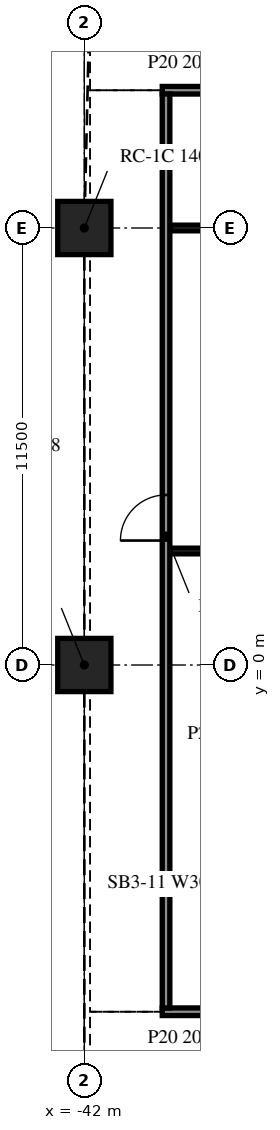
"""IFC4 building model, lengths in metres.
Left out: names, types, materials, properties, quantities, classifications, styles, units other than length and angle.
Written with IfcOpenShell. Run it as: python <this file> out.ifc"""

import sys

from ifc_helpers import new_model, si_unit, direction, frame, frame_2d, origin, origin_2d, place, context, subcontext, project, spatial, rectangle, extrude, element, fill, save


model = new_model("IFC4")
c1 = context("Model", 3, precision=1e-05, world=origin(), true_north=direction((0.0, 1.0)))
c2 = subcontext(c1, "Body", "Model", "MODEL_VIEW")
j1 = project(units=[si_unit("LENGTHUNIT", "METRE"), si_unit("PLANEANGLEUNIT", "RADIAN")], contexts=[c1])
p1 = place(None, origin())
s1 = spatial("IfcSite", under=j1, at=p1, CompositionType="ELEMENT")
p2 = place(p1, origin())
s2 = spatial("IfcBuilding", under=s1, at=p2, CompositionType="ELEMENT")
p3 = place(p2, frame((0.0, 0.0, 109.4)))
s3 = spatial("IfcBuildingStorey", under=s2, at=p3, CompositionType="ELEMENT", Elevation=109.4)
for number, where, z_axis, x_axis in (
    (1, (-42.0, 0.0, -0.34), (0.0, 0.0, 1.0), (1.0, 0.0, 0.0)),
    (2, (-42.0, 11.5, -0.34), (0.0, 0.0, 1.0), (1.0, 0.0, 0.0)),
):
    element("IfcColumn", number, at=place(p3, frame(where, z_axis=z_axis, x_axis=x_axis)), inside=s3, PredefinedType="COLUMN", context=c2, shape_type="SweptSolid", body=[
        extrude(rectangle(XDim=1.4, YDim=1.4, at=origin_2d()), origin(), (0.0, 0.0, 1.0), 4.1),
    ])
p4 = place(p3, frame((-39.95, -9.125, 0.0), z_axis=(0.0, 0.0, 1.0), x_axis=(1.0, 0.0, 0.0)))
e3 = element("IfcWall", 3, at=p4, inside=s3, PredefinedType="PARTITIONING", context=c2, shape_type="SweptSolid", body=[
    extrude(rectangle(XDim=7.75, YDim=0.2, at=frame_2d((3.875, 0.0))), origin(), (0.0, 0.0, 1.0), 3.76),
])
p5 = place(p4, frame((3.3, 0.0, 0.0)))
e4 = element("IfcOpeningElement", 4, at=p5, cuts=e3, PredefinedType="OPENING", context=c2, shape_type="SweptSolid", body=[
    extrude(rectangle(XDim=1.2, YDim=2.1, at=frame_2d((0.6, 1.05))), frame((0.0, 0.11, 0.0), z_axis=(0.0, -1.0, 0.0), x_axis=(1.0, 0.0, 0.0)), (0.0, 0.0, 1.0), 0.22),
])
for number, where, z_axis, x_axis in (
    (5, (-39.75, 3.0, 0.0), (0.0, 0.0, 1.0), (1.0, 0.0, 0.0)),
    (6, (-39.75, 11.5, 0.0), (0.0, 0.0, 1.0), (1.0, 0.0, 0.0)),
):
    element("IfcWall", number, at=place(p3, frame(where, z_axis=z_axis, x_axis=x_axis)), inside=s3, PredefinedType="PARTITIONING", context=c2, shape_type="SweptSolid", body=[
        extrude(rectangle(XDim=7.35, YDim=0.15, at=frame_2d((3.675, 0.0))), origin(), (0.0, 0.0, 1.0), 3.76),
    ])
p6 = place(p3, frame((-39.95, 15.125, 0.0), z_axis=(0.0, 0.0, 1.0), x_axis=(1.0, 0.0, 0.0)))
e7 = element("IfcWall", 7, at=p6, inside=s3, PredefinedType="PARTITIONING", context=c2, shape_type="SweptSolid", body=[
    extrude(rectangle(XDim=7.75, YDim=0.2, at=frame_2d((3.875, 0.0))), origin(), (0.0, 0.0, 1.0), 3.76),
])
p7 = place(p6, frame((3.3, 0.0, 0.0)))
e8 = element("IfcOpeningElement", 8, at=p7, cuts=e7, PredefinedType="OPENING", context=c2, shape_type="SweptSolid", body=[
    extrude(rectangle(XDim=1.2, YDim=2.1, at=frame_2d((0.6, 1.05))), frame((0.0, 0.11, 0.0), z_axis=(0.0, -1.0, 0.0), x_axis=(1.0, 0.0, 0.0)), (0.0, 0.0, 1.0), 0.22),
])
p8 = place(p3, frame((-39.85, -9.025, 0.0), z_axis=(0.0, 0.0, 1.0), x_axis=(0.0, 1.0, 0.0)))
e9 = element("IfcWall", 9, at=p8, inside=s3, PredefinedType="PARTITIONING", context=c2, shape_type="SweptSolid", body=[
    extrude(rectangle(XDim=24.05, YDim=0.2, at=frame_2d((12.025, 0.0))), origin(), (0.0, 0.0, 1.0), 3.76),
])
p9 = place(p8, frame((12.3, 0.0, 0.0)))
e10 = element("IfcOpeningElement", 10, at=p9, cuts=e9, PredefinedType="OPENING", context=c2, shape_type="SweptSolid", body=[
    extrude(rectangle(XDim=1.2, YDim=2.1, at=frame_2d((0.6, 1.05))), frame((0.0, 0.11, 0.0), z_axis=(0.0, -1.0, 0.0), x_axis=(1.0, 0.0, 0.0)), (0.0, 0.0, 1.0), 0.22),
])
p10 = place(p9, origin())
e11 = element("IfcDoor", 11, at=p10, inside=s3, OperationType="SINGLE_SWING_LEFT", PredefinedType="DOOR", context=c2, shape_type="SweptSolid", body=[
    extrude(rectangle(XDim=1.2, YDim=2.1, at=frame_2d((0.6, 1.05))), frame((0.0, 0.025, 0.0), z_axis=(0.0, -1.0, 0.0), x_axis=(1.0, 0.0, 0.0)), (0.0, 0.0, 1.0), 0.05),
])
fill(e10, e11)
save(model, sys.argv[1])
